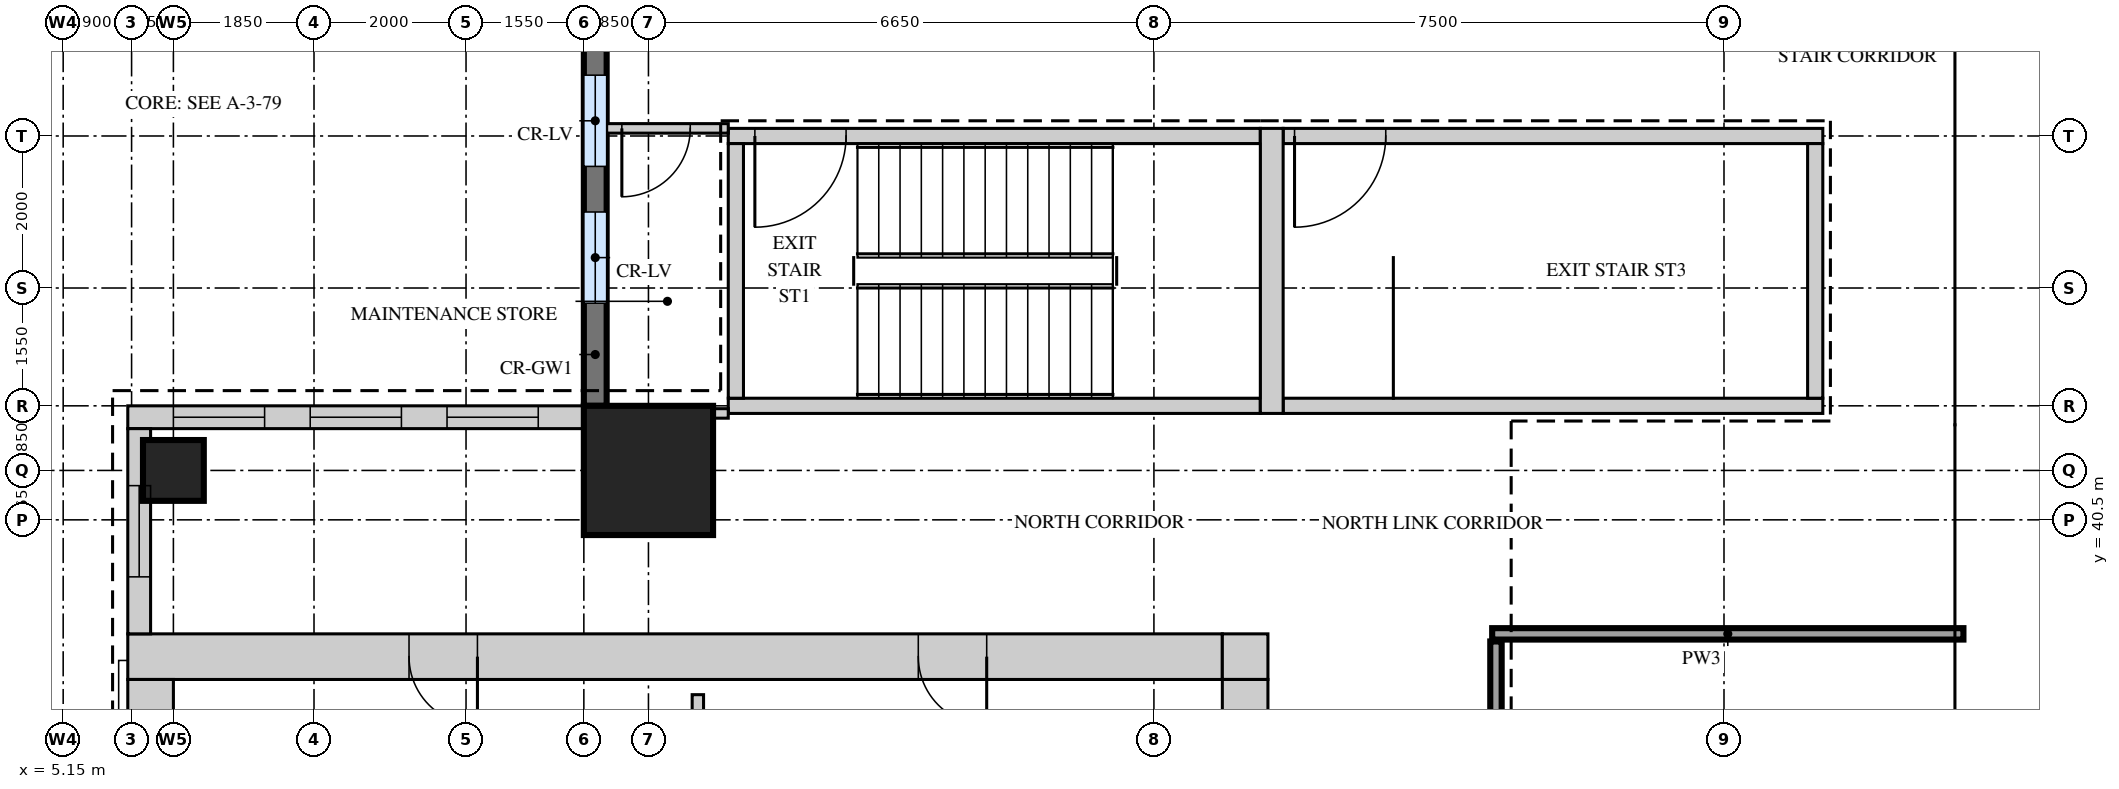
"""IFC4 building model, lengths in metres.
Left out: names, types, materials, properties, quantities, classifications, styles, units other than length and angle.
Written with IfcOpenShell. Run it as: python <this file> out.ifc"""

import sys

from ifc_helpers import new_model, si_unit, direction, frame, frame_2d, origin, origin_2d, place, context, subcontext, project, spatial, rectangle, extrude, source, transform, mapped, element, fill, save


model = new_model("IFC4")
c1 = context("Model", 3, precision=1e-05, world=origin(), true_north=direction((0.0, 1.0)))
c2 = subcontext(c1, "Body", "Model", "MODEL_VIEW")
j1 = project(units=[si_unit("LENGTHUNIT", "METRE"), si_unit("PLANEANGLEUNIT", "RADIAN")], contexts=[c1])
p1 = place(None, origin())
s1 = spatial("IfcSite", under=j1, at=p1, CompositionType="ELEMENT")
p2 = place(p1, origin())
s2 = spatial("IfcBuilding", under=s1, at=p2, CompositionType="ELEMENT")
p3 = place(p2, frame((0.0, 0.0, 343.7)))
s3 = spatial("IfcBuildingStorey", under=s2, at=p3, CompositionType="ELEMENT", Elevation=343.7)
m1 = source(origin(), c2, "Body", "SweptSolid", [
    extrude(rectangle(XDim=14.4, YDim=0.6, at=frame_2d((7.2, 0.0))), origin(), (0.0, 0.0, 1.0), 4.25),
])
p4 = place(p3, frame((6.0, 38.7, 0.0), z_axis=(0.0, 0.0, 1.0), x_axis=(1.0, 0.0, 0.0)))
e1 = element("IfcWall", 1, at=p4, inside=s3, PredefinedType="SHEAR", context=c2, shape_type="MappedRepresentation", body=[
    mapped(m1, transform((0.0, 0.0, 0.0))),
])
m2 = source(origin(), c2, "Body", "SweptSolid", [
    extrude(rectangle(XDim=0.9, YDim=2.1, at=frame_2d((0.45, 1.05))), frame((0.0, 0.31, 0.0), z_axis=(0.0, -1.0, 0.0), x_axis=(1.0, 0.0, 0.0)), (0.0, 0.0, 1.0), 0.62),
])
p5 = place(p4, frame((3.7, 0.0, 0.0)))
e2 = element("IfcOpeningElement", 2, at=p5, cuts=e1, PredefinedType="OPENING", context=c2, shape_type="MappedRepresentation", body=[
    mapped(m2, transform((0.0, 0.0, 0.0))),
])
p6 = place(p4, frame((10.4, 0.0, 0.0)))
e3 = element("IfcOpeningElement", 3, at=p6, cuts=e1, PredefinedType="OPENING", context=c2, shape_type="MappedRepresentation", body=[
    mapped(m2, transform((0.0, 0.0, 0.0))),
])
m3 = source(origin(), c2, "Body", "SweptSolid", [
    extrude(rectangle(XDim=0.6, YDim=0.6, at=frame_2d((0.3, 0.0))), origin(), (0.0, 0.0, 1.0), 4.25),
])
p7 = place(p3, frame((20.4, 38.7, 0.0), z_axis=(0.0, 0.0, 1.0), x_axis=(1.0, 0.0, 0.0)))
e4 = element("IfcWall", 4, at=p7, inside=s3, PredefinedType="SHEAR", context=c2, shape_type="MappedRepresentation", body=[
    mapped(m3, transform((0.0, 0.0, 0.0))),
])
m4 = source(origin(), c2, "Body", "SweptSolid", [
    extrude(rectangle(XDim=22.8, YDim=0.6, at=frame_2d((11.4, 0.0))), origin(), (0.0, 0.0, 1.0), 4.25),
])
p8 = place(p3, frame((20.7, 15.6, 0.0), z_axis=(0.0, 0.0, 1.0), x_axis=(0.0, 1.0, 0.0)))
e5 = element("IfcWall", 5, at=p8, inside=s3, PredefinedType="SHEAR", context=c2, shape_type="MappedRepresentation", body=[
    mapped(m4, transform((0.0, 0.0, 0.0))),
])
p9 = place(p8, frame((8.2, 0.0, 0.0)))
e6 = element("IfcOpeningElement", 6, at=p9, cuts=e5, PredefinedType="OPENING", context=c2, shape_type="MappedRepresentation", body=[
    mapped(m2, transform((0.0, 0.0, 0.0))),
])
p10 = place(p8, frame((11.35, 0.0, 0.0)))
e7 = element("IfcOpeningElement", 7, at=p10, cuts=e5, PredefinedType="OPENING", context=c2, shape_type="MappedRepresentation", body=[
    mapped(m2, transform((0.0, 0.0, 0.0))),
])
p11 = place(p8, frame((14.65, 0.0, 0.0)))
e8 = element("IfcOpeningElement", 8, at=p11, cuts=e5, PredefinedType="OPENING", context=c2, shape_type="MappedRepresentation", body=[
    mapped(m2, transform((0.0, 0.0, 0.0))),
])
p12 = place(p8, frame((1.55, 0.0, 0.0)))
e9 = element("IfcOpeningElement", 9, at=p12, cuts=e5, PredefinedType="OPENING", context=c2, shape_type="MappedRepresentation", body=[
    mapped(m2, transform((0.0, 0.0, 0.0))),
])
p13 = place(p8, frame((5.1, 0.0, 0.0)))
e10 = element("IfcOpeningElement", 10, at=p13, cuts=e5, PredefinedType="OPENING", context=c2, shape_type="MappedRepresentation", body=[
    mapped(m2, transform((0.0, 0.0, 0.0))),
])
p14 = place(p3, frame((6.3, 15.6, 0.0), z_axis=(0.0, 0.0, 1.0), x_axis=(0.0, 1.0, 0.0)))
e11 = element("IfcWall", 11, at=p14, inside=s3, PredefinedType="SHEAR", context=c2, shape_type="MappedRepresentation", body=[
    mapped(m4, transform((0.0, 0.0, 0.0))),
])
m5 = source(origin(), c2, "Body", "SweptSolid", [
    extrude(rectangle(XDim=7.0, YDim=0.2, at=frame_2d((3.5, 0.0))), origin(), (0.0, 0.0, 1.0), 4.25),
])
p15 = place(p3, frame((13.9, 45.55, 0.0), z_axis=(0.0, 0.0, 1.0), x_axis=(1.0, 0.0, 0.0)))
e12 = element("IfcWall", 12, at=p15, inside=s3, PredefinedType="SHEAR", context=c2, shape_type="MappedRepresentation", body=[
    mapped(m5, transform((0.0, 0.0, 0.0))),
])
m6 = source(origin(), c2, "Body", "SweptSolid", [
    extrude(rectangle(XDim=1.2, YDim=2.1, at=frame_2d((0.6, 1.05))), frame((0.0, 0.11, 0.0), z_axis=(0.0, -1.0, 0.0), x_axis=(1.0, 0.0, 0.0)), (0.0, 0.0, 1.0), 0.22),
])
p16 = place(p15, frame((0.35, 0.0, 0.0)))
e13 = element("IfcOpeningElement", 13, at=p16, cuts=e12, PredefinedType="OPENING", context=c2, shape_type="MappedRepresentation", body=[
    mapped(m6, transform((0.0, 0.0, 0.0))),
])
p17 = place(p3, frame((13.9, 42.0, 0.0), z_axis=(0.0, 0.0, 1.0), x_axis=(1.0, 0.0, 0.0)))
e14 = element("IfcWall", 14, at=p17, inside=s3, PredefinedType="SHEAR", context=c2, shape_type="MappedRepresentation", body=[
    mapped(m5, transform((0.0, 0.0, 0.0))),
])
m7 = source(origin(), c2, "Body", "SweptSolid", [
    extrude(rectangle(XDim=7.1, YDim=0.2, at=frame_2d((3.55, 0.0))), origin(), (0.0, 0.0, 1.0), 4.25),
])
p18 = place(p3, frame((21.2, 45.55, 0.0), z_axis=(0.0, 0.0, 1.0), x_axis=(1.0, 0.0, 0.0)))
e15 = element("IfcWall", 15, at=p18, inside=s3, PredefinedType="SHEAR", context=c2, shape_type="MappedRepresentation", body=[
    mapped(m7, transform((0.0, 0.0, 0.0))),
])
p19 = place(p18, frame((0.15, 0.0, 0.0)))
e16 = element("IfcOpeningElement", 16, at=p19, cuts=e15, PredefinedType="OPENING", context=c2, shape_type="MappedRepresentation", body=[
    mapped(m6, transform((0.0, 0.0, 0.0))),
])
p20 = place(p3, frame((21.2, 42.0, 0.0), z_axis=(0.0, 0.0, 1.0), x_axis=(1.0, 0.0, 0.0)))
e17 = element("IfcWall", 17, at=p20, inside=s3, PredefinedType="SHEAR", context=c2, shape_type="MappedRepresentation", body=[
    mapped(m7, transform((0.0, 0.0, 0.0))),
])
m8 = source(origin(), c2, "Body", "SweptSolid", [
    extrude(rectangle(XDim=3.75, YDim=0.3, at=frame_2d((1.875, 0.0))), origin(), (0.0, 0.0, 1.0), 4.25),
])
p21 = place(p3, frame((21.05, 41.9, 0.0), z_axis=(0.0, 0.0, 1.0), x_axis=(0.0, 1.0, 0.0)))
e18 = element("IfcWall", 18, at=p21, inside=s3, PredefinedType="SHEAR", context=c2, shape_type="MappedRepresentation", body=[
    mapped(m8, transform((0.0, 0.0, 0.0))),
])
m9 = source(origin(), c2, "Body", "SweptSolid", [
    extrude(rectangle(XDim=3.35, YDim=0.2, at=frame_2d((1.675, 0.0))), origin(), (0.0, 0.0, 1.0), 4.25),
])
for number, where, z_axis, x_axis in (
    (19, (14.0, 42.1, 0.0), (0.0, 0.0, 1.0), (0.0, 1.0, 0.0)),
    (20, (28.2, 42.1, 0.0), (0.0, 0.0, 1.0), (0.0, 1.0, 0.0)),
):
    element("IfcWall", number, at=place(p3, frame(where, z_axis=z_axis, x_axis=x_axis)), inside=s3, PredefinedType="SHEAR", context=c2, shape_type="MappedRepresentation", body=[
        mapped(m9, transform((0.0, 0.0, 0.0))),
    ])
m10 = source(origin(), c2, "Body", "SweptSolid", [
    extrude(rectangle(XDim=1.7, YDim=1.7, at=origin_2d()), origin(), (0.0, 0.0, 1.0), 4.5),
])
p22 = place(p3, frame((12.85, 41.15, 0.0), z_axis=(0.0, 0.0, 1.0), x_axis=(1.0, 0.0, 0.0)))
e21 = element("IfcColumn", 21, at=p22, inside=s3, PredefinedType="COLUMN", context=c2, shape_type="MappedRepresentation", body=[
    mapped(m10, transform((0.0, 0.0, 0.0))),
])
m11 = source(origin(), c2, "Body", "SweptSolid", [
    extrude(rectangle(XDim=0.8, YDim=0.8, at=origin_2d()), origin(), (0.0, 0.0, 1.0), 4.5),
])
p23 = place(p3, frame((6.6, 41.15, 0.0), z_axis=(0.0, 0.0, 1.0), x_axis=(1.0, 0.0, 0.0)))
e22 = element("IfcColumn", 22, at=p23, inside=s3, PredefinedType="COLUMN", context=c2, shape_type="MappedRepresentation", body=[
    mapped(m11, transform((0.0, 0.0, 0.0))),
])
m12 = source(origin(), c2, "Body", "SweptSolid", [
    extrude(rectangle(XDim=5.7, YDim=0.3, at=frame_2d((2.85, 0.0))), origin(), (0.0, 0.0, 1.0), 4.5),
])
p24 = place(p3, frame((12.15, 47.7, 0.0), z_axis=(0.0, 0.0, 1.0), x_axis=(0.0, -1.0, 0.0)))
e23 = element("IfcWall", 23, at=p24, inside=s3, PredefinedType="SOLIDWALL", context=c2, shape_type="MappedRepresentation", body=[
    mapped(m12, transform((0.0, 0.0, 0.0))),
])
m13 = source(origin(), c2, "Body", "SweptSolid", [
    extrude(rectangle(XDim=1.2, YDim=2.4, at=frame_2d((0.6, 1.2))), frame((0.0, 0.16, 0.0), z_axis=(0.0, -1.0, 0.0), x_axis=(1.0, 0.0, 0.0)), (0.0, 0.0, 1.0), 0.32),
])
p25 = place(p24, frame((1.35, 0.0, 0.9)))
e24 = element("IfcOpeningElement", 24, at=p25, cuts=e23, PredefinedType="OPENING", context=c2, shape_type="MappedRepresentation", body=[
    mapped(m13, transform((0.0, 0.0, 0.0))),
])
p26 = place(p24, frame((3.15, 0.0, 0.9)))
e25 = element("IfcOpeningElement", 25, at=p26, cuts=e23, PredefinedType="OPENING", context=c2, shape_type="MappedRepresentation", body=[
    mapped(m13, transform((0.0, 0.0, 0.0))),
])
m14 = source(origin(), c2, "Body", "SweptSolid", [
    extrude(rectangle(XDim=6.0, YDim=0.3, at=frame_2d((3.0, 0.0))), origin(), (0.0, 0.0, 1.0), 4.5),
])
p27 = place(p3, frame((12.0, 41.85, 0.0), z_axis=(0.0, 0.0, 1.0), x_axis=(-1.0, 0.0, 0.0)))
e26 = element("IfcWall", 26, at=p27, inside=s3, PredefinedType="SOLIDWALL", context=c2, shape_type="MappedRepresentation", body=[
    mapped(m14, transform((0.0, 0.0, 0.0))),
])
p28 = place(p27, frame((0.6, 0.0, 0.9)))
e27 = element("IfcOpeningElement", 27, at=p28, cuts=e26, PredefinedType="OPENING", context=c2, shape_type="MappedRepresentation", body=[
    mapped(m13, transform((0.0, 0.0, 0.0))),
])
p29 = place(p27, frame((2.4, 0.0, 0.9)))
e28 = element("IfcOpeningElement", 28, at=p29, cuts=e26, PredefinedType="OPENING", context=c2, shape_type="MappedRepresentation", body=[
    mapped(m13, transform((0.0, 0.0, 0.0))),
])
p30 = place(p27, frame((4.2, 0.0, 0.9)))
e29 = element("IfcOpeningElement", 29, at=p30, cuts=e26, PredefinedType="OPENING", context=c2, shape_type="MappedRepresentation", body=[
    mapped(m13, transform((0.0, 0.0, 0.0))),
])
m15 = source(origin(), c2, "Body", "SweptSolid", [
    extrude(rectangle(XDim=2.7, YDim=0.3, at=frame_2d((1.35, 0.0))), origin(), (0.0, 0.0, 1.0), 4.5),
])
p31 = place(p3, frame((6.15, 41.7, 0.0), z_axis=(0.0, 0.0, 1.0), x_axis=(0.0, -1.0, 0.0)))
e30 = element("IfcWall", 30, at=p31, inside=s3, PredefinedType="SOLIDWALL", context=c2, shape_type="MappedRepresentation", body=[
    mapped(m15, transform((0.0, 0.0, 0.0))),
])
p32 = place(p31, frame((0.75, 0.0, 0.9)))
e31 = element("IfcOpeningElement", 31, at=p32, cuts=e30, PredefinedType="OPENING", context=c2, shape_type="MappedRepresentation", body=[
    mapped(m13, transform((0.0, 0.0, 0.0))),
])
m16 = source(origin(), c2, "Body", "SweptSolid", [
    extrude(rectangle(XDim=32.6, YDim=0.15, at=frame_2d((16.3, 0.0))), origin(), (0.0, 0.0, 1.0), 4.3),
])
p33 = place(p3, frame((24.0, 6.3, 0.0), z_axis=(0.0, 0.0, 1.0), x_axis=(0.0, 1.0, 0.0)))
e32 = element("IfcWall", 32, at=p33, inside=s3, PredefinedType="PARTITIONING", context=c2, shape_type="MappedRepresentation", body=[
    mapped(m16, transform((0.0, 0.0, 0.0))),
])
m17 = source(origin(), c2, "Body", "SweptSolid", [
    extrude(rectangle(XDim=1.2, YDim=2.1, at=frame_2d((0.6, 1.05))), frame((0.0, 0.085, 0.0), z_axis=(0.0, -1.0, 0.0), x_axis=(1.0, 0.0, 0.0)), (0.0, 0.0, 1.0), 0.17),
])
p34 = place(p33, frame((13.6, 0.0, 0.0)))
e33 = element("IfcOpeningElement", 33, at=p34, cuts=e32, PredefinedType="OPENING", context=c2, shape_type="MappedRepresentation", body=[
    mapped(m17, transform((0.0, 0.0, 0.0))),
])
m18 = source(origin(), c2, "Body", "SweptSolid", [
    extrude(rectangle(XDim=0.9, YDim=2.1, at=frame_2d((0.45, 1.05))), frame((0.0, 0.085, 0.0), z_axis=(0.0, -1.0, 0.0), x_axis=(1.0, 0.0, 0.0)), (0.0, 0.0, 1.0), 0.17),
])
p35 = place(p33, frame((25.9, 0.0, 0.0)))
e34 = element("IfcOpeningElement", 34, at=p35, cuts=e32, PredefinedType="OPENING", context=c2, shape_type="MappedRepresentation", body=[
    mapped(m18, transform((0.0, 0.0, 0.0))),
])
m19 = source(origin(), c2, "Body", "SweptSolid", [
    extrude(rectangle(XDim=5.9, YDim=0.15, at=frame_2d((2.95, 0.0))), origin(), (0.0, 0.0, 1.0), 4.3),
])
p36 = place(p3, frame((13.5, 32.3, 0.0), z_axis=(0.0, 0.0, 1.0), x_axis=(0.0, 1.0, 0.0)))
e35 = element("IfcWall", 35, at=p36, inside=s3, PredefinedType="PARTITIONING", context=c2, shape_type="MappedRepresentation", body=[
    mapped(m19, transform((0.0, 0.0, 0.0))),
])
m20 = source(origin(), c2, "Body", "SweptSolid", [
    extrude(rectangle(XDim=6.2, YDim=0.15, at=frame_2d((3.1, 0.0))), origin(), (0.0, 0.0, 1.0), 4.3),
])
p37 = place(p3, frame((23.95, 39.0, 0.0), z_axis=(0.0, 0.0, 1.0), x_axis=(1.0, 0.0, 0.0)))
e36 = element("IfcWall", 36, at=p37, inside=s3, PredefinedType="PARTITIONING", context=c2, shape_type="MappedRepresentation", body=[
    mapped(m20, transform((0.0, 0.0, 0.0))),
])
m21 = source(origin(), c2, "Body", "SweptSolid", [
    extrude(rectangle(XDim=1.9, YDim=0.125, at=frame_2d((0.95, 0.0))), origin(), (0.0, 0.0, 1.0), 4.3),
])
p38 = place(p3, frame((12.0, 41.9, 0.0), z_axis=(0.0, 0.0, 1.0), x_axis=(1.0, 0.0, 0.0)))
e37 = element("IfcWall", 37, at=p38, inside=s3, PredefinedType="PARTITIONING", context=c2, shape_type="MappedRepresentation", body=[
    mapped(m21, transform((0.0, 0.0, 0.0))),
])
m22 = source(origin(), c2, "Body", "SweptSolid", [
    extrude(rectangle(XDim=1.6, YDim=0.125, at=frame_2d((0.8, 0.0))), origin(), (0.0, 0.0, 1.0), 4.3),
])
p39 = place(p3, frame((12.3, 45.65, 0.0), z_axis=(0.0, 0.0, 1.0), x_axis=(1.0, 0.0, 0.0)))
e38 = element("IfcWall", 38, at=p39, inside=s3, PredefinedType="PARTITIONING", context=c2, shape_type="MappedRepresentation", body=[
    mapped(m22, transform((0.0, 0.0, 0.0))),
])
m23 = source(origin(), c2, "Body", "SweptSolid", [
    extrude(rectangle(XDim=0.9, YDim=2.1, at=frame_2d((0.45, 1.05))), frame((0.0, 0.073, 0.0), z_axis=(0.0, -1.0, 0.0), x_axis=(1.0, 0.0, 0.0)), (0.0, 0.0, 1.0), 0.145),
])
p40 = place(p39, frame((0.2, 0.0, 0.0)))
e39 = element("IfcOpeningElement", 39, at=p40, cuts=e38, PredefinedType="OPENING", context=c2, shape_type="MappedRepresentation", body=[
    mapped(m23, transform((0.0, 0.0, 0.0))),
])
m24 = source(origin(), c2, "Body", "SweptSolid", [
    extrude(rectangle(XDim=1.2, YDim=2.4, at=frame_2d((0.6, 1.2))), frame((0.0, 0.03, 0.0), z_axis=(0.0, -1.0, 0.0), x_axis=(1.0, 0.0, 0.0)), (0.0, 0.0, 1.0), 0.06),
])
p41 = place(p25, origin())
e40 = element("IfcWindow", 40, at=p41, inside=s3, PartitioningType="SINGLE_PANEL", PredefinedType="WINDOW", context=c2, shape_type="MappedRepresentation", body=[
    mapped(m24, transform((0.0, 0.0, 0.0))),
])
fill(e24, e40)
p42 = place(p26, origin())
e41 = element("IfcWindow", 41, at=p42, inside=s3, PartitioningType="SINGLE_PANEL", PredefinedType="WINDOW", context=c2, shape_type="MappedRepresentation", body=[
    mapped(m24, transform((0.0, 0.0, 0.0))),
])
fill(e25, e41)
p43 = place(p28, origin())
e42 = element("IfcWindow", 42, at=p43, inside=s3, PartitioningType="SINGLE_PANEL", PredefinedType="WINDOW", context=c2, shape_type="MappedRepresentation", body=[
    mapped(m24, transform((0.0, 0.0, 0.0))),
])
fill(e27, e42)
p44 = place(p29, origin())
e43 = element("IfcWindow", 43, at=p44, inside=s3, PartitioningType="SINGLE_PANEL", PredefinedType="WINDOW", context=c2, shape_type="MappedRepresentation", body=[
    mapped(m24, transform((0.0, 0.0, 0.0))),
])
fill(e28, e43)
p45 = place(p30, origin())
e44 = element("IfcWindow", 44, at=p45, inside=s3, PartitioningType="SINGLE_PANEL", PredefinedType="WINDOW", context=c2, shape_type="MappedRepresentation", body=[
    mapped(m24, transform((0.0, 0.0, 0.0))),
])
fill(e29, e44)
p46 = place(p32, origin())
e45 = element("IfcWindow", 45, at=p46, inside=s3, PartitioningType="SINGLE_PANEL", PredefinedType="WINDOW", context=c2, shape_type="MappedRepresentation", body=[
    mapped(m24, transform((0.0, 0.0, 0.0))),
])
fill(e31, e45)
m25 = source(origin(), c2, "Body", "SweptSolid", [
    extrude(rectangle(XDim=0.9, YDim=2.1, at=frame_2d((0.45, 1.05))), frame((0.0, 0.025, 0.0), z_axis=(0.0, -1.0, 0.0), x_axis=(1.0, 0.0, 0.0)), (0.0, 0.0, 1.0), 0.05),
])
p47 = place(p40, origin())
e46 = element("IfcDoor", 46, at=p47, inside=s3, OperationType="SINGLE_SWING_LEFT", PredefinedType="DOOR", context=c2, shape_type="MappedRepresentation", body=[
    mapped(m25, transform((0.0, 0.0, 0.0))),
])
fill(e39, e46)
m26 = source(origin(), c2, "Body", "SweptSolid", [
    extrude(rectangle(XDim=0.9, YDim=2.1, at=frame_2d((0.45, 1.05))), frame((0.0, 0.25, 0.0), z_axis=(0.0, -1.0, 0.0), x_axis=(1.0, 0.0, 0.0)), (0.0, 0.0, 1.0), 0.5),
])
p48 = place(p5, origin())
e47 = element("IfcDoor", 47, at=p48, inside=s3, OperationType="SINGLE_SWING_RIGHT", PredefinedType="DOOR", context=c2, shape_type="MappedRepresentation", body=[
    mapped(m26, transform((0.0, 0.0, 0.0))),
])
fill(e2, e47)
p49 = place(p6, origin())
e48 = element("IfcDoor", 48, at=p49, inside=s3, OperationType="SINGLE_SWING_RIGHT", PredefinedType="DOOR", context=c2, shape_type="MappedRepresentation", body=[
    mapped(m26, transform((0.0, 0.0, 0.0))),
])
fill(e3, e48)
m27 = source(origin(), c2, "Body", "SweptSolid", [
    extrude(rectangle(XDim=1.2, YDim=2.1, at=frame_2d((0.6, 1.05))), frame((0.0, 0.025, 0.0), z_axis=(0.0, -1.0, 0.0), x_axis=(1.0, 0.0, 0.0)), (0.0, 0.0, 1.0), 0.05),
])
p50 = place(p16, origin())
e49 = element("IfcDoor", 49, at=p50, inside=s3, OperationType="SINGLE_SWING_LEFT", PredefinedType="DOOR", context=c2, shape_type="MappedRepresentation", body=[
    mapped(m27, transform((0.0, 0.0, 0.0))),
])
fill(e13, e49)
p51 = place(p19, origin())
e50 = element("IfcDoor", 50, at=p51, inside=s3, OperationType="SINGLE_SWING_LEFT", PredefinedType="DOOR", context=c2, shape_type="MappedRepresentation", body=[
    mapped(m27, transform((0.0, 0.0, 0.0))),
])
fill(e16, e50)
save(model, sys.argv[1])
